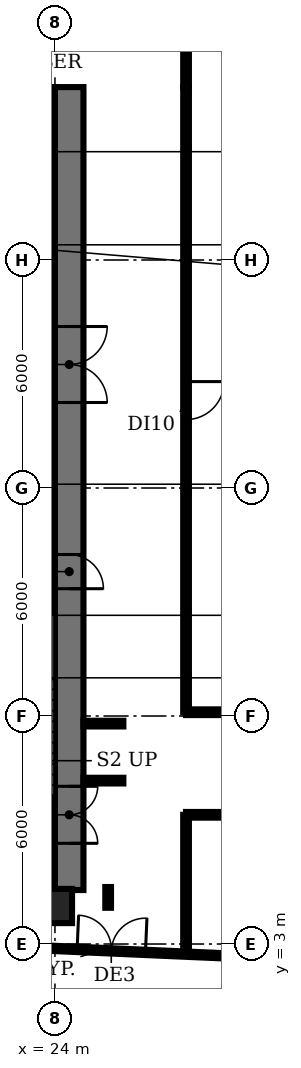
"""IFC4 building model, lengths in metres.
Left out: names, types, materials, properties, quantities, classifications, styles, units other than length and angle.
Written with IfcOpenShell. Run it as: python <this file> out.ifc"""

import sys

from ifc_helpers import new_model, si_unit, direction, frame, frame_2d, origin, origin_2d, place, context, subcontext, project, spatial, rectangle, extrude, element, fill, save


model = new_model("IFC4")
c1 = context("Model", 3, precision=1e-05, world=origin(), true_north=direction((0.0, 1.0)))
c2 = subcontext(c1, "Body", "Model", "MODEL_VIEW")
j1 = project(units=[si_unit("LENGTHUNIT", "METRE"), si_unit("PLANEANGLEUNIT", "RADIAN")], contexts=[c1])
p1 = place(None, origin())
s1 = spatial("IfcSite", under=j1, at=p1, CompositionType="ELEMENT")
p2 = place(p1, origin())
s2 = spatial("IfcBuilding", under=s1, at=p2, CompositionType="ELEMENT")
p3 = place(p2, frame((0.0, 0.0, 121.4)))
s3 = spatial("IfcBuildingStorey", under=s2, at=p3, CompositionType="ELEMENT", Elevation=121.4)
p4 = place(p3, frame((24.0, 4.0, 0.0), z_axis=(0.0, 0.0, 1.0), x_axis=(1.0, 0.0, 0.0)))
e1 = element("IfcColumn", 1, at=p4, inside=s3, PredefinedType="COLUMN", context=c2, shape_type="SweptSolid", body=[
    extrude(rectangle(XDim=0.9, YDim=0.9, at=origin_2d()), origin(), (0.0, 0.0, 1.0), 3.85),
])
p5 = place(p3, frame((22.02, 2.97, 0.0), z_axis=(0.0, 0.0, 1.0), x_axis=(0.999048576726, -0.043611252471, 0.0)))
e2 = element("IfcWall", 2, at=p5, inside=s3, PredefinedType="SOLIDWALL", context=c2, shape_type="SweptSolid", body=[
    extrude(rectangle(XDim=6.332, YDim=0.14, at=frame_2d((3.166, 0.0))), origin(), (0.0, 0.0, 1.0), 3.85),
])
p6 = place(p5, frame((2.566, 0.0, 0.0)))
e3 = element("IfcOpeningElement", 3, at=p6, cuts=e2, PredefinedType="OPENING", context=c2, shape_type="SweptSolid", body=[
    extrude(rectangle(XDim=1.8, YDim=2.4, at=frame_2d((0.9, 1.2))), frame((0.0, 0.08, 0.0), z_axis=(0.0, -1.0, 0.0), x_axis=(1.0, 0.0, 0.0)), (0.0, 0.0, 1.0), 0.16),
])
p7 = place(p3, frame((20.85, 11.825, 0.0), z_axis=(0.0, 0.0, 1.0), x_axis=(1.0, 0.0, 0.0)))
e4 = element("IfcWall", 4, at=p7, inside=s3, PredefinedType="SHEAR", context=c2, shape_type="SweptSolid", body=[
    extrude(rectangle(XDim=3.15, YDim=0.25, at=frame_2d((1.575, 0.0))), origin(), (0.0, 0.0, 1.0), 3.85),
])
p8 = place(p3, frame((16.6, 13.7, 0.0), z_axis=(0.0, 0.0, 1.0), x_axis=(1.0, 0.0, 0.0)))
e5 = element("IfcWall", 5, at=p8, inside=s3, PredefinedType="PARTITIONING", context=c2, shape_type="SweptSolid", body=[
    extrude(rectangle(XDim=7.4, YDim=0.225, at=frame_2d((3.7, 0.0))), origin(), (0.0, 0.0, 1.0), 3.85),
])
p9 = place(p3, frame((9.4, 16.5, 0.0), z_axis=(0.0, 0.0, 1.0), x_axis=(1.0, 0.0, 0.0)))
e6 = element("IfcWall", 6, at=p9, inside=s3, PredefinedType="PARTITIONING", context=c2, shape_type="SweptSolid", body=[
    extrude(rectangle(XDim=14.6, YDim=0.225, at=frame_2d((7.3, 0.0))), origin(), (0.0, 0.0, 1.0), 3.85),
])
p10 = place(p9, frame((0.75, 0.0, 0.0)))
e7 = element("IfcOpeningElement", 7, at=p10, cuts=e6, PredefinedType="OPENING", context=c2, shape_type="SweptSolid", body=[
    extrude(rectangle(XDim=1.1, YDim=2.1, at=frame_2d((0.55, 1.05))), frame((0.0, 0.123, 0.0), z_axis=(0.0, -1.0, 0.0), x_axis=(1.0, 0.0, 0.0)), (0.0, 0.0, 1.0), 0.245),
])
p11 = place(p9, frame((3.55, 0.0, 0.0)))
e8 = element("IfcOpeningElement", 8, at=p11, cuts=e6, PredefinedType="OPENING", context=c2, shape_type="SweptSolid", body=[
    extrude(rectangle(XDim=1.1, YDim=2.1, at=frame_2d((0.55, 1.05))), frame((0.0, 0.123, 0.0), z_axis=(0.0, -1.0, 0.0), x_axis=(1.0, 0.0, 0.0)), (0.0, 0.0, 1.0), 0.245),
])
p12 = place(p9, frame((6.35, 0.0, 0.0)))
e9 = element("IfcOpeningElement", 9, at=p12, cuts=e6, PredefinedType="OPENING", context=c2, shape_type="SweptSolid", body=[
    extrude(rectangle(XDim=1.1, YDim=2.1, at=frame_2d((0.55, 1.05))), frame((0.0, 0.123, 0.0), z_axis=(0.0, -1.0, 0.0), x_axis=(1.0, 0.0, 0.0)), (0.0, 0.0, 1.0), 0.245),
])
p13 = place(p9, frame((9.15, 0.0, 0.0)))
e10 = element("IfcOpeningElement", 10, at=p13, cuts=e6, PredefinedType="OPENING", context=c2, shape_type="SweptSolid", body=[
    extrude(rectangle(XDim=1.1, YDim=2.1, at=frame_2d((0.55, 1.05))), frame((0.0, 0.123, 0.0), z_axis=(0.0, -1.0, 0.0), x_axis=(1.0, 0.0, 0.0)), (0.0, 0.0, 1.0), 0.245),
])
p14 = place(p9, frame((12.4, 0.0, 0.0)))
e11 = element("IfcOpeningElement", 11, at=p14, cuts=e6, PredefinedType="OPENING", context=c2, shape_type="SweptSolid", body=[
    extrude(rectangle(XDim=1.0, YDim=2.1, at=frame_2d((0.5, 1.05))), frame((0.0, 0.123, 0.0), z_axis=(0.0, -1.0, 0.0), x_axis=(1.0, 0.0, 0.0)), (0.0, 0.0, 1.0), 0.245),
])
p15 = place(p3, frame((24.0, 20.0, 0.0), z_axis=(0.0, 0.0, 1.0), x_axis=(-1.0, 0.0, 0.0)))
e12 = element("IfcWall", 12, at=p15, inside=s3, PredefinedType="PARTITIONING", context=c2, shape_type="SweptSolid", body=[
    extrude(rectangle(XDim=14.6, YDim=0.225, at=frame_2d((7.3, 0.0))), origin(), (0.0, 0.0, 1.0), 3.85),
])
p16 = place(p15, frame((12.2, 0.0, 0.0)))
e13 = element("IfcOpeningElement", 13, at=p16, cuts=e12, PredefinedType="OPENING", context=c2, shape_type="SweptSolid", body=[
    extrude(rectangle(XDim=1.0, YDim=2.1, at=frame_2d((0.5, 1.05))), frame((0.0, 0.123, 0.0), z_axis=(0.0, -1.0, 0.0), x_axis=(1.0, 0.0, 0.0)), (0.0, 0.0, 1.0), 0.245),
])
p17 = place(p15, frame((9.025, 0.0, 0.0)))
e14 = element("IfcOpeningElement", 14, at=p17, cuts=e12, PredefinedType="OPENING", context=c2, shape_type="SweptSolid", body=[
    extrude(rectangle(XDim=0.9, YDim=2.1, at=frame_2d((0.45, 1.05))), frame((0.0, 0.123, 0.0), z_axis=(0.0, -1.0, 0.0), x_axis=(1.0, 0.0, 0.0)), (0.0, 0.0, 1.0), 0.245),
])
p18 = place(p15, frame((5.375, 0.0, 0.0)))
e15 = element("IfcOpeningElement", 15, at=p18, cuts=e12, PredefinedType="OPENING", context=c2, shape_type="SweptSolid", body=[
    extrude(rectangle(XDim=1.0, YDim=2.1, at=frame_2d((0.5, 1.05))), frame((0.0, 0.123, 0.0), z_axis=(0.0, -1.0, 0.0), x_axis=(1.0, 0.0, 0.0)), (0.0, 0.0, 1.0), 0.245),
])
p19 = place(p15, frame((1.2, 0.0, 0.0)))
e16 = element("IfcOpeningElement", 16, at=p19, cuts=e12, PredefinedType="OPENING", context=c2, shape_type="SweptSolid", body=[
    extrude(rectangle(XDim=1.0, YDim=2.1, at=frame_2d((0.5, 1.05))), frame((0.0, 0.123, 0.0), z_axis=(0.0, -1.0, 0.0), x_axis=(1.0, 0.0, 0.0)), (0.0, 0.0, 1.0), 0.245),
])
p20 = place(p3, frame((9.4, 22.8, 0.0), z_axis=(0.0, 0.0, 1.0), x_axis=(1.0, 0.0, 0.0)))
e17 = element("IfcWall", 17, at=p20, inside=s3, PredefinedType="PARTITIONING", context=c2, shape_type="SweptSolid", body=[
    extrude(rectangle(XDim=14.6, YDim=0.225, at=frame_2d((7.3, 0.0))), origin(), (0.0, 0.0, 1.0), 3.85),
])
p21 = place(p3, frame((24.375, 25.55, 0.0), z_axis=(0.0, 0.0, 1.0), x_axis=(0.0, -1.0, 0.0)))
e18 = element("IfcWall", 18, at=p21, inside=s3, PredefinedType="SHEAR", context=c2, shape_type="SweptSolid", body=[
    extrude(rectangle(XDim=21.13, YDim=0.75, at=frame_2d((10.565, 0.0))), origin(), (0.0, 0.0, 1.0), 3.85),
])
p22 = place(p21, frame((18.4, 0.0, 0.0)))
e19 = element("IfcOpeningElement", 19, at=p22, cuts=e18, PredefinedType="OPENING", context=c2, shape_type="SweptSolid", body=[
    extrude(rectangle(XDim=1.5, YDim=2.1, at=frame_2d((0.75, 1.05))), frame((0.0, 0.385, 0.0), z_axis=(0.0, -1.0, 0.0), x_axis=(1.0, 0.0, 0.0)), (0.0, 0.0, 1.0), 0.77),
])
p23 = place(p21, frame((12.3, 0.0, 0.0)))
e20 = element("IfcOpeningElement", 20, at=p23, cuts=e18, PredefinedType="OPENING", context=c2, shape_type="SweptSolid", body=[
    extrude(rectangle(XDim=0.9, YDim=2.1, at=frame_2d((0.45, 1.05))), frame((0.0, 0.385, 0.0), z_axis=(0.0, -1.0, 0.0), x_axis=(1.0, 0.0, 0.0)), (0.0, 0.0, 1.0), 0.77),
])
p24 = place(p21, frame((6.3, 0.0, 0.0)))
e21 = element("IfcOpeningElement", 21, at=p24, cuts=e18, PredefinedType="OPENING", context=c2, shape_type="SweptSolid", body=[
    extrude(rectangle(XDim=2.0, YDim=2.1, at=frame_2d((1.0, 1.05))), frame((0.0, 0.385, 0.0), z_axis=(0.0, -1.0, 0.0), x_axis=(1.0, 0.0, 0.0)), (0.0, 0.0, 1.0), 0.77),
])
p25 = place(p3, frame((24.0, 5.025, 0.0), z_axis=(0.0, 0.0, 1.0), x_axis=(-1.0, 0.0, 0.0)))
e22 = element("IfcWall", 22, at=p25, inside=s3, PredefinedType="SHEAR", context=c2, shape_type="SweptSolid", body=[
    extrude(rectangle(XDim=18.0, YDim=0.75, at=frame_2d((9.0, 0.0))), origin(), (0.0, 0.0, 1.0), 3.85),
])
p26 = place(p25, frame((0.825, 0.0, 0.0)))
e23 = element("IfcOpeningElement", 23, at=p26, cuts=e22, PredefinedType="OPENING", context=c2, shape_type="SweptSolid", body=[
    extrude(rectangle(XDim=1.5, YDim=2.1, at=frame_2d((0.75, 1.05))), frame((0.0, 0.385, 0.0), z_axis=(0.0, -1.0, 0.0), x_axis=(1.0, 0.0, 0.0)), (0.0, 0.0, 1.0), 0.77),
])
p27 = place(p25, frame((15.675, 0.0, 0.0)))
e24 = element("IfcOpeningElement", 24, at=p27, cuts=e22, PredefinedType="OPENING", context=c2, shape_type="SweptSolid", body=[
    extrude(rectangle(XDim=1.5, YDim=2.1, at=frame_2d((0.75, 1.05))), frame((0.0, 0.385, 0.0), z_axis=(0.0, -1.0, 0.0), x_axis=(1.0, 0.0, 0.0)), (0.0, 0.0, 1.0), 0.77),
])
p28 = place(p25, frame((13.0, 0.0, 0.0)))
e25 = element("IfcOpeningElement", 25, at=p28, cuts=e22, PredefinedType="OPENING", context=c2, shape_type="SweptSolid", body=[
    extrude(rectangle(XDim=1.2, YDim=2.1, at=frame_2d((0.6, 1.05))), frame((0.0, 0.385, 0.0), z_axis=(0.0, -1.0, 0.0), x_axis=(1.0, 0.0, 0.0)), (0.0, 0.0, 1.0), 0.77),
])
p29 = place(p25, frame((4.35, 0.0, 0.0)))
e26 = element("IfcOpeningElement", 26, at=p29, cuts=e22, PredefinedType="OPENING", context=c2, shape_type="SweptSolid", body=[
    extrude(rectangle(XDim=1.0, YDim=2.1, at=frame_2d((0.5, 1.05))), frame((0.0, 0.385, 0.0), z_axis=(0.0, -1.0, 0.0), x_axis=(1.0, 0.0, 0.0)), (0.0, 0.0, 1.0), 0.77),
])
p30 = place(p3, frame((6.0, 25.175, 0.0), z_axis=(0.0, 0.0, 1.0), x_axis=(1.0, 0.0, 0.0)))
e27 = element("IfcWall", 27, at=p30, inside=s3, PredefinedType="SHEAR", context=c2, shape_type="SweptSolid", body=[
    extrude(rectangle(XDim=18.0, YDim=0.75, at=frame_2d((9.0, 0.0))), origin(), (0.0, 0.0, 1.0), 3.85),
])
for number, where, z_axis, x_axis in (
    (28, (24.75, 7.3, 0.0), (0.0, 0.0, 1.0), (1.0, 0.0, 0.0)),
    (29, (24.75, 8.8, 0.0), (0.0, 0.0, 1.0), (1.0, 0.0, 0.0)),
):
    element("IfcWall", number, at=place(p3, frame(where, z_axis=z_axis, x_axis=x_axis)), inside=s3, PredefinedType="PARTITIONING", context=c2, shape_type="SweptSolid", body=[
        extrude(rectangle(XDim=1.05, YDim=0.15, at=frame_2d((0.525, 0.0))), origin(), (0.0, 0.0, 1.0), 2.83),
    ])
p31 = place(p3, frame((25.4, 3.954, 0.0), z_axis=(0.0, 0.0, 1.0), x_axis=(0.0, 1.0, 0.0)))
e30 = element("IfcWall", 30, at=p31, inside=s3, PredefinedType="PARTITIONING", context=c2, shape_type="SweptSolid", body=[
    extrude(rectangle(XDim=0.546, YDim=0.15, at=frame_2d((0.273, 0.0))), origin(), (0.0, 0.0, 1.0), 2.83),
])
p32 = place(p3, frame((27.45, 2.78, 0.0), z_axis=(0.0, 0.0, 1.0), x_axis=(0.0, 1.0, 0.0)))
e31 = element("IfcWall", 31, at=p32, inside=s3, PredefinedType="PARTITIONING", context=c2, shape_type="SweptSolid", body=[
    extrude(rectangle(XDim=3.62, YDim=0.15, at=frame_2d((1.81, 0.0))), origin(), (0.0, 0.0, 1.0), 2.83),
])
p33 = place(p3, frame((27.45, 9.1, 0.0), z_axis=(0.0, 0.0, 1.0), x_axis=(1.0, 0.0, 0.0)))
e32 = element("IfcWall", 32, at=p33, inside=s3, PredefinedType="PARTITIONING", context=c2, shape_type="SweptSolid", body=[
    extrude(rectangle(XDim=8.55, YDim=0.15, at=frame_2d((4.275, 0.0))), origin(), (0.0, 0.0, 1.0), 2.83),
])
p34 = place(p3, frame((27.45, 25.55, 0.0), z_axis=(0.0, 0.0, 1.0), x_axis=(0.0, -1.0, 0.0)))
e33 = element("IfcWall", 33, at=p34, inside=s3, PredefinedType="PARTITIONING", context=c2, shape_type="SweptSolid", body=[
    extrude(rectangle(XDim=16.45, YDim=0.15, at=frame_2d((8.225, 0.0))), origin(), (0.0, 0.0, 1.0), 2.83),
])
p35 = place(p34, frame((7.75, 0.0, 0.0)))
e34 = element("IfcOpeningElement", 34, at=p35, cuts=e33, PredefinedType="OPENING", context=c2, shape_type="SweptSolid", body=[
    extrude(rectangle(XDim=1.0, YDim=2.1, at=frame_2d((0.5, 1.05))), frame((0.0, 0.085, 0.0), z_axis=(0.0, -1.0, 0.0), x_axis=(1.0, 0.0, 0.0)), (0.0, 0.0, 1.0), 0.17),
])
p36 = place(p3, frame((27.45, 25.55, 0.0), z_axis=(0.0, 0.0, 1.0), x_axis=(0.0, 1.0, 0.0)))
e35 = element("IfcWall", 35, at=p36, inside=s3, PredefinedType="PARTITIONING", context=c2, shape_type="SweptSolid", body=[
    extrude(rectangle(XDim=3.9, YDim=0.15, at=frame_2d((1.95, 0.0))), origin(), (0.0, 0.0, 1.0), 2.83),
])
p37 = place(p3, frame((42.0, 6.4, 0.0), z_axis=(0.0, 0.0, 1.0), x_axis=(-1.0, 0.0, 0.0)))
e36 = element("IfcWall", 36, at=p37, inside=s3, PredefinedType="PARTITIONING", context=c2, shape_type="SweptSolid", body=[
    extrude(rectangle(XDim=14.55, YDim=0.15, at=frame_2d((7.275, 0.0))), origin(), (0.0, 0.0, 1.0), 2.83),
])
p38 = place(p37, frame((7.45, 0.0, 0.0)))
e37 = element("IfcOpeningElement", 37, at=p38, cuts=e36, PredefinedType="OPENING", context=c2, shape_type="SweptSolid", body=[
    extrude(rectangle(XDim=1.2, YDim=2.1, at=frame_2d((0.6, 1.05))), frame((0.0, 0.085, 0.0), z_axis=(0.0, -1.0, 0.0), x_axis=(1.0, 0.0, 0.0)), (0.0, 0.0, 1.0), 0.17),
])
p39 = place(p6, origin())
e38 = element("IfcDoor", 38, at=p39, inside=s3, OperationType="DOUBLE_DOOR_DOUBLE_SWING", PredefinedType="DOOR", context=c2, shape_type="SweptSolid", body=[
    extrude(rectangle(XDim=1.8, YDim=2.4, at=frame_2d((0.9, 1.2))), frame((0.0, 0.025, 0.0), z_axis=(0.0, -1.0, 0.0), x_axis=(1.0, 0.0, 0.0)), (0.0, 0.0, 1.0), 0.05),
])
fill(e3, e38)
p40 = place(p22, origin())
e39 = element("IfcDoor", 39, at=p40, inside=s3, OperationType="DOUBLE_DOOR_SINGLE_SWING", PredefinedType="DOOR", context=c2, shape_type="SweptSolid", body=[
    extrude(rectangle(XDim=1.5, YDim=2.1, at=frame_2d((0.75, 1.05))), frame((0.0, 0.025, 0.0), z_axis=(0.0, -1.0, 0.0), x_axis=(1.0, 0.0, 0.0)), (0.0, 0.0, 1.0), 0.05),
])
fill(e19, e39)
p41 = place(p23, origin())
e40 = element("IfcDoor", 40, at=p41, inside=s3, OperationType="SINGLE_SWING_RIGHT", PredefinedType="DOOR", context=c2, shape_type="SweptSolid", body=[
    extrude(rectangle(XDim=0.9, YDim=2.1, at=frame_2d((0.45, 1.05))), frame((0.0, -0.315, 0.0), z_axis=(0.0, -1.0, 0.0), x_axis=(1.0, 0.0, 0.0)), (0.0, 0.0, 1.0), 0.05),
])
fill(e20, e40)
p42 = place(p24, origin())
e41 = element("IfcDoor", 41, at=p42, inside=s3, OperationType="DOUBLE_DOOR_SINGLE_SWING", PredefinedType="DOOR", context=c2, shape_type="SweptSolid", body=[
    extrude(rectangle(XDim=2.0, YDim=2.1, at=frame_2d((1.0, 1.05))), frame((0.0, 0.025, 0.0), z_axis=(0.0, -1.0, 0.0), x_axis=(1.0, 0.0, 0.0)), (0.0, 0.0, 1.0), 0.05),
])
fill(e21, e41)
p43 = place(p35, origin())
e42 = element("IfcDoor", 42, at=p43, inside=s3, OperationType="SINGLE_SWING_LEFT", PredefinedType="DOOR", context=c2, shape_type="SweptSolid", body=[
    extrude(rectangle(XDim=1.0, YDim=2.1, at=frame_2d((0.5, 1.05))), frame((0.0, 0.025, 0.0), z_axis=(0.0, -1.0, 0.0), x_axis=(1.0, 0.0, 0.0)), (0.0, 0.0, 1.0), 0.05),
])
fill(e34, e42)
save(model, sys.argv[1])
